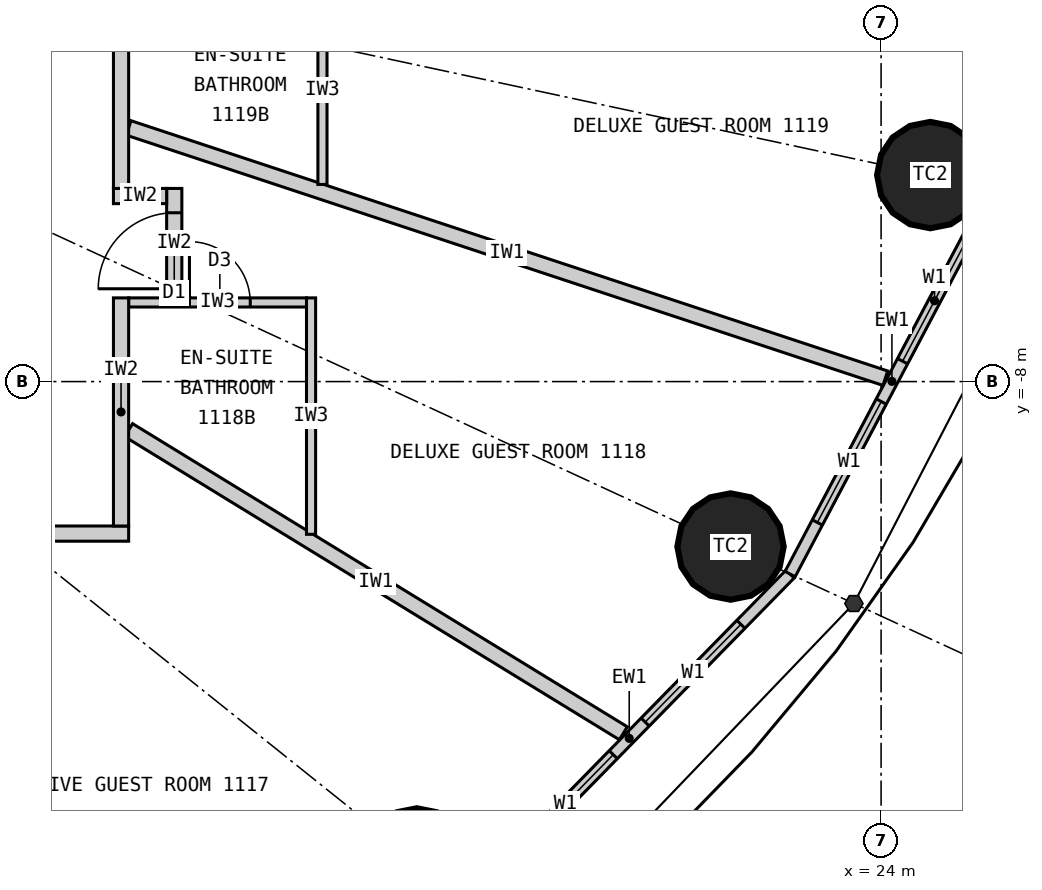
"""IFC4 building model, lengths in metres.
Left out: names, types, materials, properties, quantities, classifications, styles, units other than length and angle.
Written with IfcOpenShell. Run it as: python <this file> out.ifc"""

import sys

from ifc_helpers import new_model, si_unit, direction, frame, frame_2d, origin, origin_2d, place, context, subcontext, project, spatial, rectangle, circle, extrude, element, fill, save


model = new_model("IFC4")
c1 = context("Model", 3, precision=1e-05, world=origin(), true_north=direction((0.0, 1.0)))
c2 = subcontext(c1, "Body", "Model", "MODEL_VIEW")
j1 = project(units=[si_unit("LENGTHUNIT", "METRE"), si_unit("PLANEANGLEUNIT", "RADIAN")], contexts=[c1])
p1 = place(None, origin())
s1 = spatial("IfcSite", under=j1, at=p1, CompositionType="ELEMENT")
p2 = place(p1, origin())
s2 = spatial("IfcBuilding", under=s1, at=p2, CompositionType="ELEMENT")
p3 = place(p2, frame((0.0, 0.0, 50.7)))
s3 = spatial("IfcBuildingStorey", under=s2, at=p3, CompositionType="ELEMENT", Elevation=50.7)
for number, where, z_axis, x_axis in (
    (1, (17.892, -14.313, 0.0), (0.0, 0.0, 1.0), (1.0, 0.0, 0.0)),
    (2, (22.019, -10.17, 0.0), (0.0, 0.0, 1.0), (1.0, 0.0, 0.0)),
    (3, (24.647, -5.283, 0.0), (0.0, 0.0, 1.0), (1.0, 0.0, 0.0)),
):
    element("IfcColumn", number, at=place(p3, frame(where, z_axis=z_axis, x_axis=x_axis)), inside=s3, PredefinedType="COLUMN", context=c2, shape_type="SweptSolid", body=[
        extrude(circle(Radius=0.7, at=origin_2d()), origin(), (0.0, 0.0, 1.0), 3.3),
    ])
p4 = place(p3, frame((18.57, -14.856, 0.0), z_axis=(0.0, 0.0, 1.0), x_axis=(0.699602905915, 0.714531856557, 0.0)))
e4 = element("IfcWall", 4, at=p4, inside=s3, PredefinedType="ELEMENTEDWALL", context=c2, shape_type="SweptSolid", body=[
    extrude(rectangle(XDim=6.051, YDim=0.15, at=frame_2d((3.025, 0.0))), origin(), (0.0, 0.0, 1.0), 3.12),
])
p5 = place(p4, frame((0.926, 0.0, 0.9)))
e5 = element("IfcOpeningElement", 5, at=p5, cuts=e4, PredefinedType="OPENING", context=c2, shape_type="SweptSolid", body=[
    extrude(rectangle(XDim=1.8, YDim=1.9, at=frame_2d((0.9, 0.95))), frame((0.0, 0.085, 0.0), z_axis=(0.0, -1.0, 0.0), x_axis=(1.0, 0.0, 0.0)), (0.0, 0.0, 1.0), 0.17),
])
p6 = place(p4, frame((3.325, 0.0, 0.9)))
e6 = element("IfcOpeningElement", 6, at=p6, cuts=e4, PredefinedType="OPENING", context=c2, shape_type="SweptSolid", body=[
    extrude(rectangle(XDim=1.8, YDim=1.9, at=frame_2d((0.9, 0.95))), frame((0.0, 0.085, 0.0), z_axis=(0.0, -1.0, 0.0), x_axis=(1.0, 0.0, 0.0)), (0.0, 0.0, 1.0), 0.17),
])
p7 = place(p3, frame((22.803, -10.532, 0.0), z_axis=(0.0, 0.0, 1.0), x_axis=(0.467296867008, 0.884100468321, 0.0)))
e7 = element("IfcWall", 7, at=p7, inside=s3, PredefinedType="ELEMENTEDWALL", context=c2, shape_type="SweptSolid", body=[
    extrude(rectangle(XDim=5.734, YDim=0.15, at=frame_2d((2.867, 0.0))), origin(), (0.0, 0.0, 1.0), 3.12),
])
p8 = place(p7, frame((0.767, 0.0, 0.9)))
e8 = element("IfcOpeningElement", 8, at=p8, cuts=e7, PredefinedType="OPENING", context=c2, shape_type="SweptSolid", body=[
    extrude(rectangle(XDim=1.8, YDim=1.9, at=frame_2d((0.9, 0.95))), frame((0.0, 0.085, 0.0), z_axis=(0.0, -1.0, 0.0), x_axis=(1.0, 0.0, 0.0)), (0.0, 0.0, 1.0), 0.17),
])
p9 = place(p7, frame((3.167, 0.0, 0.9)))
e9 = element("IfcOpeningElement", 9, at=p9, cuts=e7, PredefinedType="OPENING", context=c2, shape_type="SweptSolid", body=[
    extrude(rectangle(XDim=1.8, YDim=1.9, at=frame_2d((0.9, 0.95))), frame((0.0, 0.085, 0.0), z_axis=(0.0, -1.0, 0.0), x_axis=(1.0, 0.0, 0.0)), (0.0, 0.0, 1.0), 0.17),
])
p10 = place(p3, frame((14.1, -8.639, 0.0), z_axis=(0.0, 0.0, 1.0), x_axis=(0.852672493023, -0.522445805459, 0.0)))
e10 = element("IfcWall", 10, at=p10, inside=s3, PredefinedType="PARTITIONING", context=c2, shape_type="SweptSolid", body=[
    extrude(rectangle(XDim=7.633, YDim=0.2, at=frame_2d((3.817, 0.0))), origin(), (0.0, 0.0, 1.0), 3.12),
])
p11 = place(p3, frame((14.1, -4.663, 0.0), z_axis=(0.0, 0.0, 1.0), x_axis=(0.949432655039, -0.31397075269, 0.0)))
e11 = element("IfcWall", 11, at=p11, inside=s3, PredefinedType="PARTITIONING", context=c2, shape_type="SweptSolid", body=[
    extrude(rectangle(XDim=10.486, YDim=0.2, at=frame_2d((5.243, 0.0))), origin(), (0.0, 0.0, 1.0), 3.12),
])
p12 = place(p3, frame((16.5, -10.01, 0.0), z_axis=(0.0, 0.0, 1.0), x_axis=(0.0, 1.0, 0.0)))
e12 = element("IfcWall", 12, at=p12, inside=s3, PredefinedType="PARTITIONING", context=c2, shape_type="SweptSolid", body=[
    extrude(rectangle(XDim=3.111, YDim=0.12, at=frame_2d((1.555, 0.0))), origin(), (0.0, 0.0, 1.0), 3.12),
])
p13 = place(p3, frame((14.1, -6.959, 0.0), z_axis=(0.0, 0.0, 1.0), x_axis=(1.0, 0.0, 0.0)))
e13 = element("IfcWall", 13, at=p13, inside=s3, PredefinedType="PARTITIONING", context=c2, shape_type="SweptSolid", body=[
    extrude(rectangle(XDim=2.34, YDim=0.12, at=frame_2d((1.17, 0.0))), origin(), (0.0, 0.0, 1.0), 3.12),
])
p14 = place(p13, frame((0.8, 0.0, 0.0)))
e14 = element("IfcOpeningElement", 14, at=p14, cuts=e13, PredefinedType="OPENING", context=c2, shape_type="SweptSolid", body=[
    extrude(rectangle(XDim=0.8, YDim=2.1, at=frame_2d((0.4, 1.05))), frame((0.0, 0.07, 0.0), z_axis=(0.0, -1.0, 0.0), x_axis=(1.0, 0.0, 0.0)), (0.0, 0.0, 1.0), 0.14),
])
p15 = place(p3, frame((16.65, -5.406, 0.0), z_axis=(0.0, 0.0, 1.0), x_axis=(0.0, 1.0, 0.0)))
e15 = element("IfcWall", 15, at=p15, inside=s3, PredefinedType="PARTITIONING", context=c2, shape_type="SweptSolid", body=[
    extrude(rectangle(XDim=2.483, YDim=0.12, at=frame_2d((1.242, 0.0))), origin(), (0.0, 0.0, 1.0), 3.12),
])
p16 = place(p3, frame((14.7, -6.899, 0.0), z_axis=(0.0, 0.0, 1.0), x_axis=(0.0, 1.0, 0.0)))
e16 = element("IfcWall", 16, at=p16, inside=s3, PredefinedType="PARTITIONING", context=c2, shape_type="SweptSolid", body=[
    extrude(rectangle(XDim=1.44, YDim=0.2, at=frame_2d((0.72, 0.0))), origin(), (0.0, 0.0, 1.0), 3.12),
])
p17 = place(p16, frame((0.12, 0.0, 0.0)))
e17 = element("IfcOpeningElement", 17, at=p17, cuts=e16, PredefinedType="OPENING", context=c2, shape_type="SweptSolid", body=[
    extrude(rectangle(XDim=1.0, YDim=2.2, at=frame_2d((0.5, 1.1))), frame((0.0, 0.11, 0.0), z_axis=(0.0, -1.0, 0.0), x_axis=(1.0, 0.0, 0.0)), (0.0, 0.0, 1.0), 0.22),
])
p18 = place(p3, frame((13.9, -5.559, 0.0), z_axis=(0.0, 0.0, 1.0), x_axis=(1.0, 0.0, 0.0)))
e18 = element("IfcWall", 18, at=p18, inside=s3, PredefinedType="PARTITIONING", context=c2, shape_type="SweptSolid", body=[
    extrude(rectangle(XDim=0.7, YDim=0.2, at=frame_2d((0.35, 0.0))), origin(), (0.0, 0.0, 1.0), 3.12),
])
p19 = place(p3, frame((14.1, -10.0, 0.0), z_axis=(0.0, 0.0, 1.0), x_axis=(-1.0, 0.0, 0.0)))
e19 = element("IfcWall", 19, at=p19, inside=s3, PredefinedType="PARTITIONING", context=c2, shape_type="SweptSolid", body=[
    extrude(rectangle(XDim=2.481, YDim=0.2, at=frame_2d((1.24, 0.0))), origin(), (0.0, 0.0, 1.0), 3.12),
])
p20 = place(p3, frame((14.0, -9.9, 0.0), z_axis=(0.0, 0.0, 1.0), x_axis=(0.0, 1.0, 0.0)))
e20 = element("IfcWall", 20, at=p20, inside=s3, PredefinedType="PARTITIONING", context=c2, shape_type="SweptSolid", body=[
    extrude(rectangle(XDim=3.001, YDim=0.2, at=frame_2d((1.5, 0.0))), origin(), (0.0, 0.0, 1.0), 3.12),
])
p21 = place(p3, frame((14.0, -5.459, 0.0), z_axis=(0.0, 0.0, 1.0), x_axis=(0.0, 1.0, 0.0)))
e21 = element("IfcWall", 21, at=p21, inside=s3, PredefinedType="PARTITIONING", context=c2, shape_type="SweptSolid", body=[
    extrude(rectangle(XDim=15.359, YDim=0.2, at=frame_2d((7.679, 0.0))), origin(), (0.0, 0.0, 1.0), 3.12),
])
p22 = place(p21, frame((2.656, 0.0, 0.0)))
e22 = element("IfcOpeningElement", 22, at=p22, cuts=e21, PredefinedType="OPENING", context=c2, shape_type="SweptSolid", body=[
    extrude(rectangle(XDim=1.0, YDim=2.2, at=frame_2d((0.5, 1.1))), frame((0.0, 0.11, 0.0), z_axis=(0.0, -1.0, 0.0), x_axis=(1.0, 0.0, 0.0)), (0.0, 0.0, 1.0), 0.22),
])
p23 = place(p21, frame((6.537, 0.0, 0.0)))
e23 = element("IfcOpeningElement", 23, at=p23, cuts=e21, PredefinedType="OPENING", context=c2, shape_type="SweptSolid", body=[
    extrude(rectangle(XDim=1.0, YDim=2.2, at=frame_2d((0.5, 1.1))), frame((0.0, 0.11, 0.0), z_axis=(0.0, -1.0, 0.0), x_axis=(1.0, 0.0, 0.0)), (0.0, 0.0, 1.0), 0.22),
])
p24 = place(p21, frame((12.682, 0.0, 0.0)))
e24 = element("IfcOpeningElement", 24, at=p24, cuts=e21, PredefinedType="OPENING", context=c2, shape_type="SweptSolid", body=[
    extrude(rectangle(XDim=1.0, YDim=2.2, at=frame_2d((0.5, 1.1))), frame((0.0, 0.11, 0.0), z_axis=(0.0, -1.0, 0.0), x_axis=(1.0, 0.0, 0.0)), (0.0, 0.0, 1.0), 0.22),
])
p25 = place(p5, origin())
e25 = element("IfcWindow", 25, at=p25, inside=s3, PartitioningType="SINGLE_PANEL", PredefinedType="WINDOW", context=c2, shape_type="SweptSolid", body=[
    extrude(rectangle(XDim=1.8, YDim=1.9, at=frame_2d((0.9, 0.95))), frame((0.0, 0.03, 0.0), z_axis=(0.0, -1.0, 0.0), x_axis=(1.0, 0.0, 0.0)), (0.0, 0.0, 1.0), 0.06),
])
fill(e5, e25)
p26 = place(p6, origin())
e26 = element("IfcWindow", 26, at=p26, inside=s3, PartitioningType="SINGLE_PANEL", PredefinedType="WINDOW", context=c2, shape_type="SweptSolid", body=[
    extrude(rectangle(XDim=1.8, YDim=1.9, at=frame_2d((0.9, 0.95))), frame((0.0, 0.03, 0.0), z_axis=(0.0, -1.0, 0.0), x_axis=(1.0, 0.0, 0.0)), (0.0, 0.0, 1.0), 0.06),
])
fill(e6, e26)
p27 = place(p8, origin())
e27 = element("IfcWindow", 27, at=p27, inside=s3, PartitioningType="SINGLE_PANEL", PredefinedType="WINDOW", context=c2, shape_type="SweptSolid", body=[
    extrude(rectangle(XDim=1.8, YDim=1.9, at=frame_2d((0.9, 0.95))), frame((0.0, 0.03, 0.0), z_axis=(0.0, -1.0, 0.0), x_axis=(1.0, 0.0, 0.0)), (0.0, 0.0, 1.0), 0.06),
])
fill(e8, e27)
p28 = place(p9, origin())
e28 = element("IfcWindow", 28, at=p28, inside=s3, PartitioningType="SINGLE_PANEL", PredefinedType="WINDOW", context=c2, shape_type="SweptSolid", body=[
    extrude(rectangle(XDim=1.8, YDim=1.9, at=frame_2d((0.9, 0.95))), frame((0.0, 0.03, 0.0), z_axis=(0.0, -1.0, 0.0), x_axis=(1.0, 0.0, 0.0)), (0.0, 0.0, 1.0), 0.06),
])
fill(e9, e28)
p29 = place(p14, origin())
e29 = element("IfcDoor", 29, at=p29, inside=s3, OperationType="SINGLE_SWING_LEFT", PredefinedType="DOOR", context=c2, shape_type="SweptSolid", body=[
    extrude(rectangle(XDim=0.8, YDim=2.1, at=frame_2d((0.4, 1.05))), frame((0.0, 0.025, 0.0), z_axis=(0.0, -1.0, 0.0), x_axis=(1.0, 0.0, 0.0)), (0.0, 0.0, 1.0), 0.05),
])
fill(e14, e29)
p30 = place(p17, origin())
e30 = element("IfcDoor", 30, at=p30, inside=s3, OperationType="SINGLE_SWING_LEFT", PredefinedType="DOOR", context=c2, shape_type="SweptSolid", body=[
    extrude(rectangle(XDim=1.0, YDim=2.2, at=frame_2d((0.5, 1.1))), frame((0.0, 0.025, 0.0), z_axis=(0.0, -1.0, 0.0), x_axis=(1.0, 0.0, 0.0)), (0.0, 0.0, 1.0), 0.05),
])
fill(e17, e30)
save(model, sys.argv[1])
